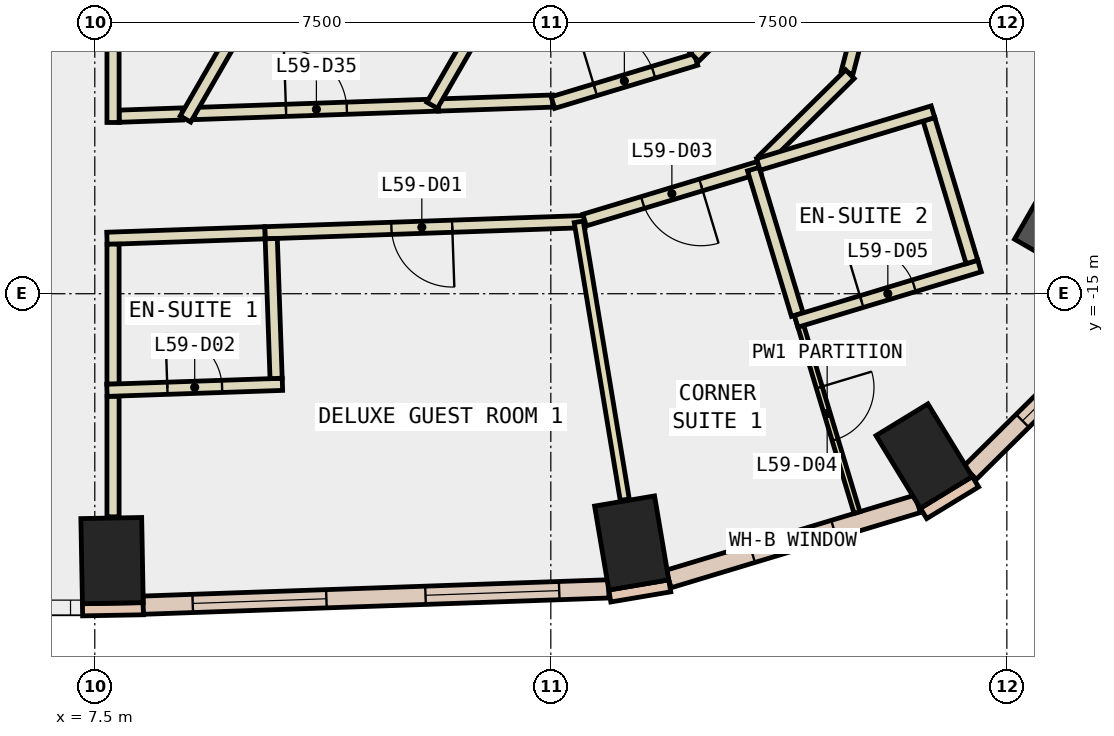
"""IFC4 building model, lengths in metres.
Left out: names, types, materials, properties, quantities, classifications, styles, units other than length and angle.
Written with IfcOpenShell. Run it as: python <this file> out.ifc"""

import sys

from ifc_helpers import new_model, si_unit, direction, frame, frame_2d, origin, origin_2d, place, context, subcontext, project, spatial, rectangle, extrude, element, fill, save


model = new_model("IFC4")
c1 = context("Model", 3, precision=1e-05, world=origin(), true_north=direction((0.0, 1.0)))
c2 = subcontext(c1, "Body", "Model", "MODEL_VIEW")
j1 = project(units=[si_unit("LENGTHUNIT", "METRE"), si_unit("PLANEANGLEUNIT", "RADIAN")], contexts=[c1])
p1 = place(None, origin())
s1 = spatial("IfcSite", under=j1, at=p1, CompositionType="ELEMENT")
p2 = place(p1, origin())
s2 = spatial("IfcBuilding", under=s1, at=p2, CompositionType="ELEMENT")
p3 = place(p2, frame((0.0, 0.0, 259.4)))
s3 = spatial("IfcBuildingStorey", under=s2, at=p3, CompositionType="ELEMENT", Elevation=259.4)
for number, where, z_axis, x_axis in (
    (1, (7.784, -19.389, -0.34), (0.0, 0.0, 1.0), (1.0, 0.018, 0.0)),
    (2, (16.33, -19.099, -0.34), (0.0, 0.0, 1.0), (0.986, 0.167, 0.0)),
    (3, (21.14, -17.67, -0.34), (0.0, 0.0, 1.0), (0.853, 0.521, 0.0)),
):
    element("IfcColumn", number, at=place(p3, frame(where, z_axis=z_axis, x_axis=x_axis)), inside=s3, PredefinedType="COLUMN", context=c2, shape_type="SweptSolid", body=[
        extrude(rectangle(XDim=1.0, YDim=1.4, at=origin_2d()), origin(), (0.0, 0.0, 1.0), 3.6),
    ])
p4 = place(p3, frame((23.856, -13.774, -0.34), z_axis=(0.0, 0.0, 1.0), x_axis=(-0.866025403784, 0.5, 0.0)))
e4 = element("IfcColumn", 4, at=p4, inside=s3, PredefinedType="COLUMN", context=c2, shape_type="SweptSolid", body=[
    extrude(rectangle(XDim=1.8, YDim=1.8, at=origin_2d()), origin(), (0.0, 0.0, 1.0), 3.6),
])
for number, where, z_axis, x_axis in (
    (5, (7.298, -20.198, 0.0), (0.0, 0.0, 1.0), (1.0, 0.018, 0.0)),
    (6, (15.97, -19.971, 0.0), (0.0, 0.0, 1.0), (0.986, 0.167, 0.0)),
):
    element("IfcWall", number, at=place(p3, frame(where, z_axis=z_axis, x_axis=x_axis)), inside=s3, PredefinedType="STANDARD", context=c2, shape_type="SweptSolid", body=[
        extrude(rectangle(XDim=1.0, YDim=0.2, at=frame_2d((0.5, 0.0))), origin(), (0.0, 0.0, 1.0), 3.26),
    ])
p5 = place(p3, frame((21.13, -18.613, 0.0), z_axis=(0.0, 0.0, 1.0), x_axis=(0.853679739553, 0.520798331677, 0.0)))
e7 = element("IfcWall", 7, at=p5, inside=s3, PredefinedType="STANDARD", context=c2, shape_type="SweptSolid", body=[
    extrude(rectangle(XDim=1.0, YDim=0.2, at=frame_2d((0.5, 0.0))), origin(), (0.0, 0.0, 1.0), 3.26),
])
p6 = place(p3, frame((8.296, -20.122, 0.0), z_axis=(0.0, 0.0, 1.0), x_axis=(0.999387577449, 0.034992428331, 0.0)))
e8 = element("IfcWall", 8, at=p6, inside=s3, PredefinedType="STANDARD", context=c2, shape_type="SweptSolid", body=[
    extrude(rectangle(XDim=7.661, YDim=0.3, at=frame_2d((3.83, 0.0))), origin(), (0.0, 0.0, 1.0), 3.26),
])
p7 = place(p6, frame((0.815, 0.0, 0.9)))
e9 = element("IfcOpeningElement", 9, at=p7, cuts=e8, PredefinedType="OPENING", context=c2, shape_type="SweptSolid", body=[
    extrude(rectangle(XDim=2.2, YDim=2.0, at=frame_2d((1.1, 1.0))), frame((0.0, 0.16, 0.0), z_axis=(0.0, -1.0, 0.0), x_axis=(1.0, 0.0, 0.0)), (0.0, 0.0, 1.0), 0.32),
])
p8 = place(p6, frame((4.646, 0.0, 0.9)))
e10 = element("IfcOpeningElement", 10, at=p8, cuts=e8, PredefinedType="OPENING", context=c2, shape_type="SweptSolid", body=[
    extrude(rectangle(XDim=2.2, YDim=2.0, at=frame_2d((1.1, 1.0))), frame((0.0, 0.16, 0.0), z_axis=(0.0, -1.0, 0.0), x_axis=(1.0, 0.0, 0.0)), (0.0, 0.0, 1.0), 0.32),
])
p9 = place(p3, frame((16.936, -19.692, 0.0), z_axis=(0.0, 0.0, 1.0), x_axis=(0.957346168713, 0.288943442997, 0.0)))
e11 = element("IfcWall", 11, at=p9, inside=s3, PredefinedType="STANDARD", context=c2, shape_type="SweptSolid", body=[
    extrude(rectangle(XDim=4.281, YDim=0.3, at=frame_2d((2.14, 0.0))), origin(), (0.0, 0.0, 1.0), 3.26),
])
p10 = place(p9, frame((1.44, 0.0, 0.9)))
e12 = element("IfcOpeningElement", 12, at=p10, cuts=e11, PredefinedType="OPENING", context=c2, shape_type="SweptSolid", body=[
    extrude(rectangle(XDim=1.4, YDim=2.0, at=frame_2d((0.7, 1.0))), frame((0.0, 0.16, 0.0), z_axis=(0.0, -1.0, 0.0), x_axis=(1.0, 0.0, 0.0)), (0.0, 0.0, 1.0), 0.32),
])
p11 = place(p3, frame((21.893, -17.946, 0.0), z_axis=(0.0, 0.0, 1.0), x_axis=(0.71110935557, 0.703081420904, 0.0)))
e13 = element("IfcWall", 13, at=p11, inside=s3, PredefinedType="STANDARD", context=c2, shape_type="SweptSolid", body=[
    extrude(rectangle(XDim=3.832, YDim=0.3, at=frame_2d((1.916, 0.0))), origin(), (0.0, 0.0, 1.0), 3.26),
])
p12 = place(p11, frame((1.216, 0.0, 0.9)))
e14 = element("IfcOpeningElement", 14, at=p12, cuts=e13, PredefinedType="OPENING", context=c2, shape_type="SweptSolid", body=[
    extrude(rectangle(XDim=1.4, YDim=2.0, at=frame_2d((0.7, 1.0))), frame((0.0, 0.16, 0.0), z_axis=(0.0, -1.0, 0.0), x_axis=(1.0, 0.0, 0.0)), (0.0, 0.0, 1.0), 0.32),
])
p13 = place(p3, frame((7.9, -12.081, 0.0), z_axis=(0.0, 0.0, 1.0), x_axis=(0.999365240621, 0.035624652105, 0.0)))
e15 = element("IfcWall", 15, at=p13, inside=s3, PredefinedType="PARTITIONING", context=c2, shape_type="SweptSolid", body=[
    extrude(rectangle(XDim=1.042, YDim=0.2, at=frame_2d((0.521, 0.0))), origin(), (0.0, 0.0, 1.0), 3.26),
])
p14 = place(p3, frame((9.141, -12.037, 0.0), z_axis=(0.0, 0.0, 1.0), x_axis=(0.999388955878, 0.034953038062, 0.0)))
e16 = element("IfcWall", 16, at=p14, inside=s3, PredefinedType="PARTITIONING", context=c2, shape_type="SweptSolid", body=[
    extrude(rectangle(XDim=4.009, YDim=0.2, at=frame_2d((2.005, 0.0))), origin(), (0.0, 0.0, 1.0), 3.26),
])
p15 = place(p14, frame((1.505, 0.0, 0.0)))
e17 = element("IfcOpeningElement", 17, at=p15, cuts=e16, PredefinedType="OPENING", context=c2, shape_type="SweptSolid", body=[
    extrude(rectangle(XDim=1.0, YDim=2.1, at=frame_2d((0.5, 1.05))), frame((0.0, 0.11, 0.0), z_axis=(0.0, -1.0, 0.0), x_axis=(1.0, 0.0, 0.0)), (0.0, 0.0, 1.0), 0.22),
])
p16 = place(p3, frame((13.148, -11.897, 0.0), z_axis=(0.0, 0.0, 1.0), x_axis=(0.999405229262, 0.034484601243, 0.0)))
e18 = element("IfcWall", 18, at=p16, inside=s3, PredefinedType="PARTITIONING", context=c2, shape_type="SweptSolid", body=[
    extrude(rectangle(XDim=1.883, YDim=0.2, at=frame_2d((0.942, 0.0))), origin(), (0.0, 0.0, 1.0), 3.26),
])
p17 = place(p3, frame((15.034, -11.857, 0.0), z_axis=(0.0, 0.0, 1.0), x_axis=(0.957338084933, 0.288970225346, 0.0)))
e19 = element("IfcWall", 19, at=p17, inside=s3, PredefinedType="PARTITIONING", context=c2, shape_type="SweptSolid", body=[
    extrude(rectangle(XDim=2.457, YDim=0.2, at=frame_2d((1.229, 0.0))), origin(), (0.0, 0.0, 1.0), 3.26),
])
p18 = place(p17, frame((0.728, 0.0, 0.0)))
e20 = element("IfcOpeningElement", 20, at=p18, cuts=e19, PredefinedType="OPENING", context=c2, shape_type="SweptSolid", body=[
    extrude(rectangle(XDim=1.0, YDim=2.1, at=frame_2d((0.5, 1.05))), frame((0.0, 0.11, 0.0), z_axis=(0.0, -1.0, 0.0), x_axis=(1.0, 0.0, 0.0)), (0.0, 0.0, 1.0), 0.22),
])
p19 = place(p3, frame((17.362, -11.106, 0.0), z_axis=(0.0, 0.0, 1.0), x_axis=(0.710859741153, 0.703333795866, 0.0)))
e21 = element("IfcWall", 21, at=p19, inside=s3, PredefinedType="PARTITIONING", context=c2, shape_type="SweptSolid", body=[
    extrude(rectangle(XDim=1.071, YDim=0.2, at=frame_2d((0.535, 0.0))), origin(), (0.0, 0.0, 1.0), 3.26),
])
p20 = place(p3, frame((15.559, -13.814, 0.0), z_axis=(0.0, 0.0, 1.0), x_axis=(-0.999388410674, -0.034968623214, 0.0)))
e22 = element("IfcWall", 22, at=p20, inside=s3, PredefinedType="PARTITIONING", context=c2, shape_type="SweptSolid", body=[
    extrude(rectangle(XDim=5.264, YDim=0.2, at=frame_2d((2.632, 0.0))), origin(), (0.0, 0.0, 1.0), 3.26),
])
p21 = place(p20, frame((2.182, 0.0, 0.0)))
e23 = element("IfcOpeningElement", 23, at=p21, cuts=e22, PredefinedType="OPENING", context=c2, shape_type="SweptSolid", body=[
    extrude(rectangle(XDim=1.0, YDim=2.1, at=frame_2d((0.5, 1.05))), frame((0.0, 0.11, 0.0), z_axis=(0.0, -1.0, 0.0), x_axis=(1.0, 0.0, 0.0)), (0.0, 0.0, 1.0), 0.22),
])
p22 = place(p3, frame((10.298, -13.998, 0.0), z_axis=(0.0, 0.0, 1.0), x_axis=(-0.999386321032, -0.035028293342, 0.0)))
e24 = element("IfcWall", 24, at=p22, inside=s3, PredefinedType="PARTITIONING", context=c2, shape_type="SweptSolid", body=[
    extrude(rectangle(XDim=2.6, YDim=0.2, at=frame_2d((1.3, 0.0))), origin(), (0.0, 0.0, 1.0), 3.26),
])
p23 = place(p3, frame((18.427, -12.922, 0.0), z_axis=(0.0, 0.0, 1.0), x_axis=(-0.957336631432, -0.288975040651, 0.0)))
e25 = element("IfcWall", 25, at=p23, inside=s3, PredefinedType="PARTITIONING", context=c2, shape_type="SweptSolid", body=[
    extrude(rectangle(XDim=3.0, YDim=0.2, at=frame_2d((1.5, 0.0))), origin(), (0.0, 0.0, 1.0), 3.26),
])
p24 = place(p23, frame((1.0, 0.0, 0.0)))
e26 = element("IfcOpeningElement", 26, at=p24, cuts=e25, PredefinedType="OPENING", context=c2, shape_type="SweptSolid", body=[
    extrude(rectangle(XDim=1.0, YDim=2.1, at=frame_2d((0.5, 1.05))), frame((0.0, 0.11, 0.0), z_axis=(0.0, -1.0, 0.0), x_axis=(1.0, 0.0, 0.0)), (0.0, 0.0, 1.0), 0.22),
])
p25 = place(p3, frame((20.327, -9.629, 0.0), z_axis=(0.0, 0.0, 1.0), x_axis=(-0.253192482031, -0.967415922467, 0.0)))
e27 = element("IfcWall", 27, at=p25, inside=s3, PredefinedType="PARTITIONING", context=c2, shape_type="SweptSolid", body=[
    extrude(rectangle(XDim=1.792, YDim=0.2, at=frame_2d((0.896, 0.0))), origin(), (0.0, 0.0, 1.0), 3.26),
])
p26 = place(p3, frame((19.919, -11.39, 0.0), z_axis=(0.0, 0.0, 1.0), x_axis=(-0.71104667794, -0.70314480855, 0.0)))
e28 = element("IfcWall", 28, at=p26, inside=s3, PredefinedType="PARTITIONING", context=c2, shape_type="SweptSolid", body=[
    extrude(rectangle(XDim=2.008, YDim=0.2, at=frame_2d((1.004, 0.0))), origin(), (0.0, 0.0, 1.0), 3.26),
])
p27 = place(p3, frame((7.8, -7.499, 0.0), z_axis=(0.0, 0.0, 1.0), x_axis=(0.0, -1.0, 0.0)))
e29 = element("IfcWall", 29, at=p27, inside=s3, PredefinedType="PARTITIONING", context=c2, shape_type="SweptSolid", body=[
    extrude(rectangle(XDim=4.685, YDim=0.2, at=frame_2d((2.343, 0.0))), origin(), (0.0, 0.0, 1.0), 3.26),
])
p28 = place(p27, frame((1.842, 0.0, 0.0)))
e30 = element("IfcOpeningElement", 30, at=p28, cuts=e29, PredefinedType="OPENING", context=c2, shape_type="SweptSolid", body=[
    extrude(rectangle(XDim=1.0, YDim=2.1, at=frame_2d((0.5, 1.05))), frame((0.0, 0.11, 0.0), z_axis=(0.0, -1.0, 0.0), x_axis=(1.0, 0.0, 0.0)), (0.0, 0.0, 1.0), 0.22),
])
p29 = place(p3, frame((7.8, -16.686, 0.0), z_axis=(0.0, 0.0, 1.0), x_axis=(0.0, -1.0, 0.0)))
e31 = element("IfcWall", 31, at=p29, inside=s3, PredefinedType="PARTITIONING", context=c2, shape_type="SweptSolid", body=[
    extrude(rectangle(XDim=1.983, YDim=0.2, at=frame_2d((0.991, 0.0))), origin(), (0.0, 0.0, 1.0), 3.26),
])
p30 = place(p3, frame((7.8, -14.185, 0.0), z_axis=(0.0, 0.0, 1.0), x_axis=(0.0, -1.0, 0.0)))
e32 = element("IfcWall", 32, at=p30, inside=s3, PredefinedType="PARTITIONING", context=c2, shape_type="SweptSolid", body=[
    extrude(rectangle(XDim=2.301, YDim=0.2, at=frame_2d((1.15, 0.0))), origin(), (0.0, 0.0, 1.0), 3.26),
])
p31 = place(p3, frame((11.794, -7.271, 0.0), z_axis=(0.0, 0.0, 1.0), x_axis=(-0.499918457185, -0.866072477433, 0.0)))
e33 = element("IfcWall", 33, at=p31, inside=s3, PredefinedType="PARTITIONING", context=c2, shape_type="SweptSolid", body=[
    extrude(rectangle(XDim=5.607, YDim=0.2, at=frame_2d((2.803, 0.0))), origin(), (0.0, 0.0, 1.0), 3.26),
])
p32 = place(p3, frame((14.739, -8.972, 0.0), z_axis=(0.0, 0.0, 1.0), x_axis=(-0.499974489635, -0.8660401317, 0.0)))
e34 = element("IfcWall", 34, at=p32, inside=s3, PredefinedType="PARTITIONING", context=c2, shape_type="SweptSolid", body=[
    extrude(rectangle(XDim=3.382, YDim=0.2, at=frame_2d((1.691, 0.0))), origin(), (0.0, 0.0, 1.0), 3.26),
])
p33 = place(p3, frame((7.7, -16.589, 0.0), z_axis=(0.0, 0.0, 1.0), x_axis=(0.999410709261, 0.034325416459, 0.0)))
e35 = element("IfcWall", 35, at=p33, inside=s3, PredefinedType="PARTITIONING", context=c2, shape_type="SweptSolid", body=[
    extrude(rectangle(XDim=2.888, YDim=0.2, at=frame_2d((1.444, 0.0))), origin(), (0.0, 0.0, 1.0), 3.26),
])
p34 = place(p33, frame((0.994, 0.0, 0.0)))
e36 = element("IfcOpeningElement", 36, at=p34, cuts=e35, PredefinedType="OPENING", context=c2, shape_type="SweptSolid", body=[
    extrude(rectangle(XDim=0.9, YDim=2.1, at=frame_2d((0.45, 1.05))), frame((0.0, 0.11, 0.0), z_axis=(0.0, -1.0, 0.0), x_axis=(1.0, 0.0, 0.0)), (0.0, 0.0, 1.0), 0.22),
])
p35 = place(p3, frame((10.482, -16.393, 0.0), z_axis=(0.0, 0.0, 1.0), x_axis=(-0.034703518322, 0.999397651496, 0.0)))
e37 = element("IfcWall", 37, at=p35, inside=s3, PredefinedType="PARTITIONING", context=c2, shape_type="SweptSolid", body=[
    extrude(rectangle(XDim=2.301, YDim=0.2, at=frame_2d((1.15, 0.0))), origin(), (0.0, 0.0, 1.0), 3.26),
])
p36 = place(p3, frame((15.459, -13.818, 0.0), z_axis=(0.0, 0.0, 1.0), x_axis=(0.163441652939, -0.986553002167, 0.0)))
e38 = element("IfcWall", 38, at=p36, inside=s3, PredefinedType="PARTITIONING", context=c2, shape_type="SweptSolid", body=[
    extrude(rectangle(XDim=4.632, YDim=0.15, at=frame_2d((2.316, 0.0))), origin(), (0.0, 0.0, 1.0), 3.26),
])
p37 = place(p3, frame((19.054, -15.344, 0.0), z_axis=(0.0, 0.0, 1.0), x_axis=(0.288803435252, -0.957388414274, 0.0)))
e39 = element("IfcWall", 39, at=p37, inside=s3, PredefinedType="PARTITIONING", context=c2, shape_type="SweptSolid", body=[
    extrude(rectangle(XDim=3.4, YDim=0.1, at=frame_2d((1.7, 0.0))), origin(), (0.0, 0.0, 1.0), 3.26),
])
p38 = place(p37, frame((1.25, 0.0, 0.0)))
e40 = element("IfcOpeningElement", 40, at=p38, cuts=e39, PredefinedType="OPENING", context=c2, shape_type="SweptSolid", body=[
    extrude(rectangle(XDim=0.9, YDim=2.1, at=frame_2d((0.45, 1.05))), frame((0.0, 0.06, 0.0), z_axis=(0.0, -1.0, 0.0), x_axis=(1.0, 0.0, 0.0)), (0.0, 0.0, 1.0), 0.12),
])
p39 = place(p3, frame((18.331, -12.951, 0.0), z_axis=(0.0, 0.0, 1.0), x_axis=(0.289175152117, -0.957276204341, 0.0)))
e41 = element("IfcWall", 41, at=p39, inside=s3, PredefinedType="PARTITIONING", context=c2, shape_type="SweptSolid", body=[
    extrude(rectangle(XDim=2.5, YDim=0.2, at=frame_2d((1.25, 0.0))), origin(), (0.0, 0.0, 1.0), 3.26),
])
p40 = place(p3, frame((19.035, -15.455, 0.0), z_axis=(0.0, 0.0, 1.0), x_axis=(0.957248369253, 0.28926728049, 0.0)))
e42 = element("IfcWall", 42, at=p40, inside=s3, PredefinedType="PARTITIONING", context=c2, shape_type="SweptSolid", body=[
    extrude(rectangle(XDim=3.15, YDim=0.2, at=frame_2d((1.575, 0.0))), origin(), (0.0, 0.0, 1.0), 3.26),
])
p41 = place(p40, frame((1.125, 0.0, 0.0)))
e43 = element("IfcOpeningElement", 43, at=p41, cuts=e42, PredefinedType="OPENING", context=c2, shape_type="SweptSolid", body=[
    extrude(rectangle(XDim=0.9, YDim=2.1, at=frame_2d((0.45, 1.05))), frame((0.0, 0.11, 0.0), z_axis=(0.0, -1.0, 0.0), x_axis=(1.0, 0.0, 0.0)), (0.0, 0.0, 1.0), 0.22),
])
p42 = place(p3, frame((21.926, -14.478, 0.0), z_axis=(0.0, 0.0, 1.0), x_axis=(-0.288928787246, 0.957350591947, 0.0)))
e44 = element("IfcWall", 44, at=p42, inside=s3, PredefinedType="PARTITIONING", context=c2, shape_type="SweptSolid", body=[
    extrude(rectangle(XDim=2.45, YDim=0.2, at=frame_2d((1.225, 0.0))), origin(), (0.0, 0.0, 1.0), 3.26),
])
p43 = place(p3, frame((21.285, -12.007, 0.0), z_axis=(0.0, 0.0, 1.0), x_axis=(-0.957329834998, -0.288997555392, 0.0)))
e45 = element("IfcWall", 45, at=p43, inside=s3, PredefinedType="PARTITIONING", context=c2, shape_type="SweptSolid", body=[
    extrude(rectangle(XDim=3.0, YDim=0.2, at=frame_2d((1.5, 0.0))), origin(), (0.0, 0.0, 1.0), 3.26),
])
p44 = place(p7, origin())
e46 = element("IfcWindow", 46, at=p44, inside=s3, PartitioningType="SINGLE_PANEL", PredefinedType="WINDOW", context=c2, shape_type="SweptSolid", body=[
    extrude(rectangle(XDim=2.2, YDim=2.0, at=frame_2d((1.1, 1.0))), frame((0.0, 0.03, 0.0), z_axis=(0.0, -1.0, 0.0), x_axis=(1.0, 0.0, 0.0)), (0.0, 0.0, 1.0), 0.06),
])
fill(e9, e46)
p45 = place(p8, origin())
e47 = element("IfcWindow", 47, at=p45, inside=s3, PartitioningType="SINGLE_PANEL", PredefinedType="WINDOW", context=c2, shape_type="SweptSolid", body=[
    extrude(rectangle(XDim=2.2, YDim=2.0, at=frame_2d((1.1, 1.0))), frame((0.0, 0.03, 0.0), z_axis=(0.0, -1.0, 0.0), x_axis=(1.0, 0.0, 0.0)), (0.0, 0.0, 1.0), 0.06),
])
fill(e10, e47)
p46 = place(p10, origin())
e48 = element("IfcWindow", 48, at=p46, inside=s3, PartitioningType="SINGLE_PANEL", PredefinedType="WINDOW", context=c2, shape_type="SweptSolid", body=[
    extrude(rectangle(XDim=1.4, YDim=2.0, at=frame_2d((0.7, 1.0))), frame((0.0, 0.03, 0.0), z_axis=(0.0, -1.0, 0.0), x_axis=(1.0, 0.0, 0.0)), (0.0, 0.0, 1.0), 0.06),
])
fill(e12, e48)
p47 = place(p12, origin())
e49 = element("IfcWindow", 49, at=p47, inside=s3, PartitioningType="SINGLE_PANEL", PredefinedType="WINDOW", context=c2, shape_type="SweptSolid", body=[
    extrude(rectangle(XDim=1.4, YDim=2.0, at=frame_2d((0.7, 1.0))), frame((0.0, 0.03, 0.0), z_axis=(0.0, -1.0, 0.0), x_axis=(1.0, 0.0, 0.0)), (0.0, 0.0, 1.0), 0.06),
])
fill(e14, e49)
p48 = place(p21, origin())
e50 = element("IfcDoor", 50, at=p48, inside=s3, OperationType="SINGLE_SWING_LEFT", PredefinedType="DOOR", context=c2, shape_type="SweptSolid", body=[
    extrude(rectangle(XDim=1.0, YDim=2.1, at=frame_2d((0.5, 1.05))), frame((0.0, 0.025, 0.0), z_axis=(0.0, -1.0, 0.0), x_axis=(1.0, 0.0, 0.0)), (0.0, 0.0, 1.0), 0.05),
])
fill(e23, e50)
p49 = place(p34, origin())
e51 = element("IfcDoor", 51, at=p49, inside=s3, OperationType="SINGLE_SWING_LEFT", PredefinedType="DOOR", context=c2, shape_type="SweptSolid", body=[
    extrude(rectangle(XDim=0.9, YDim=2.1, at=frame_2d((0.45, 1.05))), frame((0.0, 0.025, 0.0), z_axis=(0.0, -1.0, 0.0), x_axis=(1.0, 0.0, 0.0)), (0.0, 0.0, 1.0), 0.05),
])
fill(e36, e51)
p50 = place(p24, origin())
e52 = element("IfcDoor", 52, at=p50, inside=s3, OperationType="SINGLE_SWING_LEFT", PredefinedType="DOOR", context=c2, shape_type="SweptSolid", body=[
    extrude(rectangle(XDim=1.0, YDim=2.1, at=frame_2d((0.5, 1.05))), frame((0.0, 0.025, 0.0), z_axis=(0.0, -1.0, 0.0), x_axis=(1.0, 0.0, 0.0)), (0.0, 0.0, 1.0), 0.05),
])
fill(e26, e52)
p51 = place(p38, origin())
e53 = element("IfcDoor", 53, at=p51, inside=s3, OperationType="SINGLE_SWING_RIGHT", PredefinedType="DOOR", context=c2, shape_type="SweptSolid", body=[
    extrude(rectangle(XDim=0.9, YDim=2.1, at=frame_2d((0.45, 1.05))), frame((0.0, 0.025, 0.0), z_axis=(0.0, -1.0, 0.0), x_axis=(1.0, 0.0, 0.0)), (0.0, 0.0, 1.0), 0.05),
])
fill(e40, e53)
p52 = place(p41, origin())
e54 = element("IfcDoor", 54, at=p52, inside=s3, OperationType="SINGLE_SWING_LEFT", PredefinedType="DOOR", context=c2, shape_type="SweptSolid", body=[
    extrude(rectangle(XDim=0.9, YDim=2.1, at=frame_2d((0.45, 1.05))), frame((0.0, 0.025, 0.0), z_axis=(0.0, -1.0, 0.0), x_axis=(1.0, 0.0, 0.0)), (0.0, 0.0, 1.0), 0.05),
])
fill(e43, e54)
p53 = place(p15, origin())
e55 = element("IfcDoor", 55, at=p53, inside=s3, OperationType="SINGLE_SWING_LEFT", PredefinedType="DOOR", context=c2, shape_type="SweptSolid", body=[
    extrude(rectangle(XDim=1.0, YDim=2.1, at=frame_2d((0.5, 1.05))), frame((0.0, 0.025, 0.0), z_axis=(0.0, -1.0, 0.0), x_axis=(1.0, 0.0, 0.0)), (0.0, 0.0, 1.0), 0.05),
])
fill(e17, e55)
p54 = place(p18, origin())
e56 = element("IfcDoor", 56, at=p54, inside=s3, OperationType="SINGLE_SWING_LEFT", PredefinedType="DOOR", context=c2, shape_type="SweptSolid", body=[
    extrude(rectangle(XDim=1.0, YDim=2.1, at=frame_2d((0.5, 1.05))), frame((0.0, 0.025, 0.0), z_axis=(0.0, -1.0, 0.0), x_axis=(1.0, 0.0, 0.0)), (0.0, 0.0, 1.0), 0.05),
])
fill(e20, e56)
save(model, sys.argv[1])
